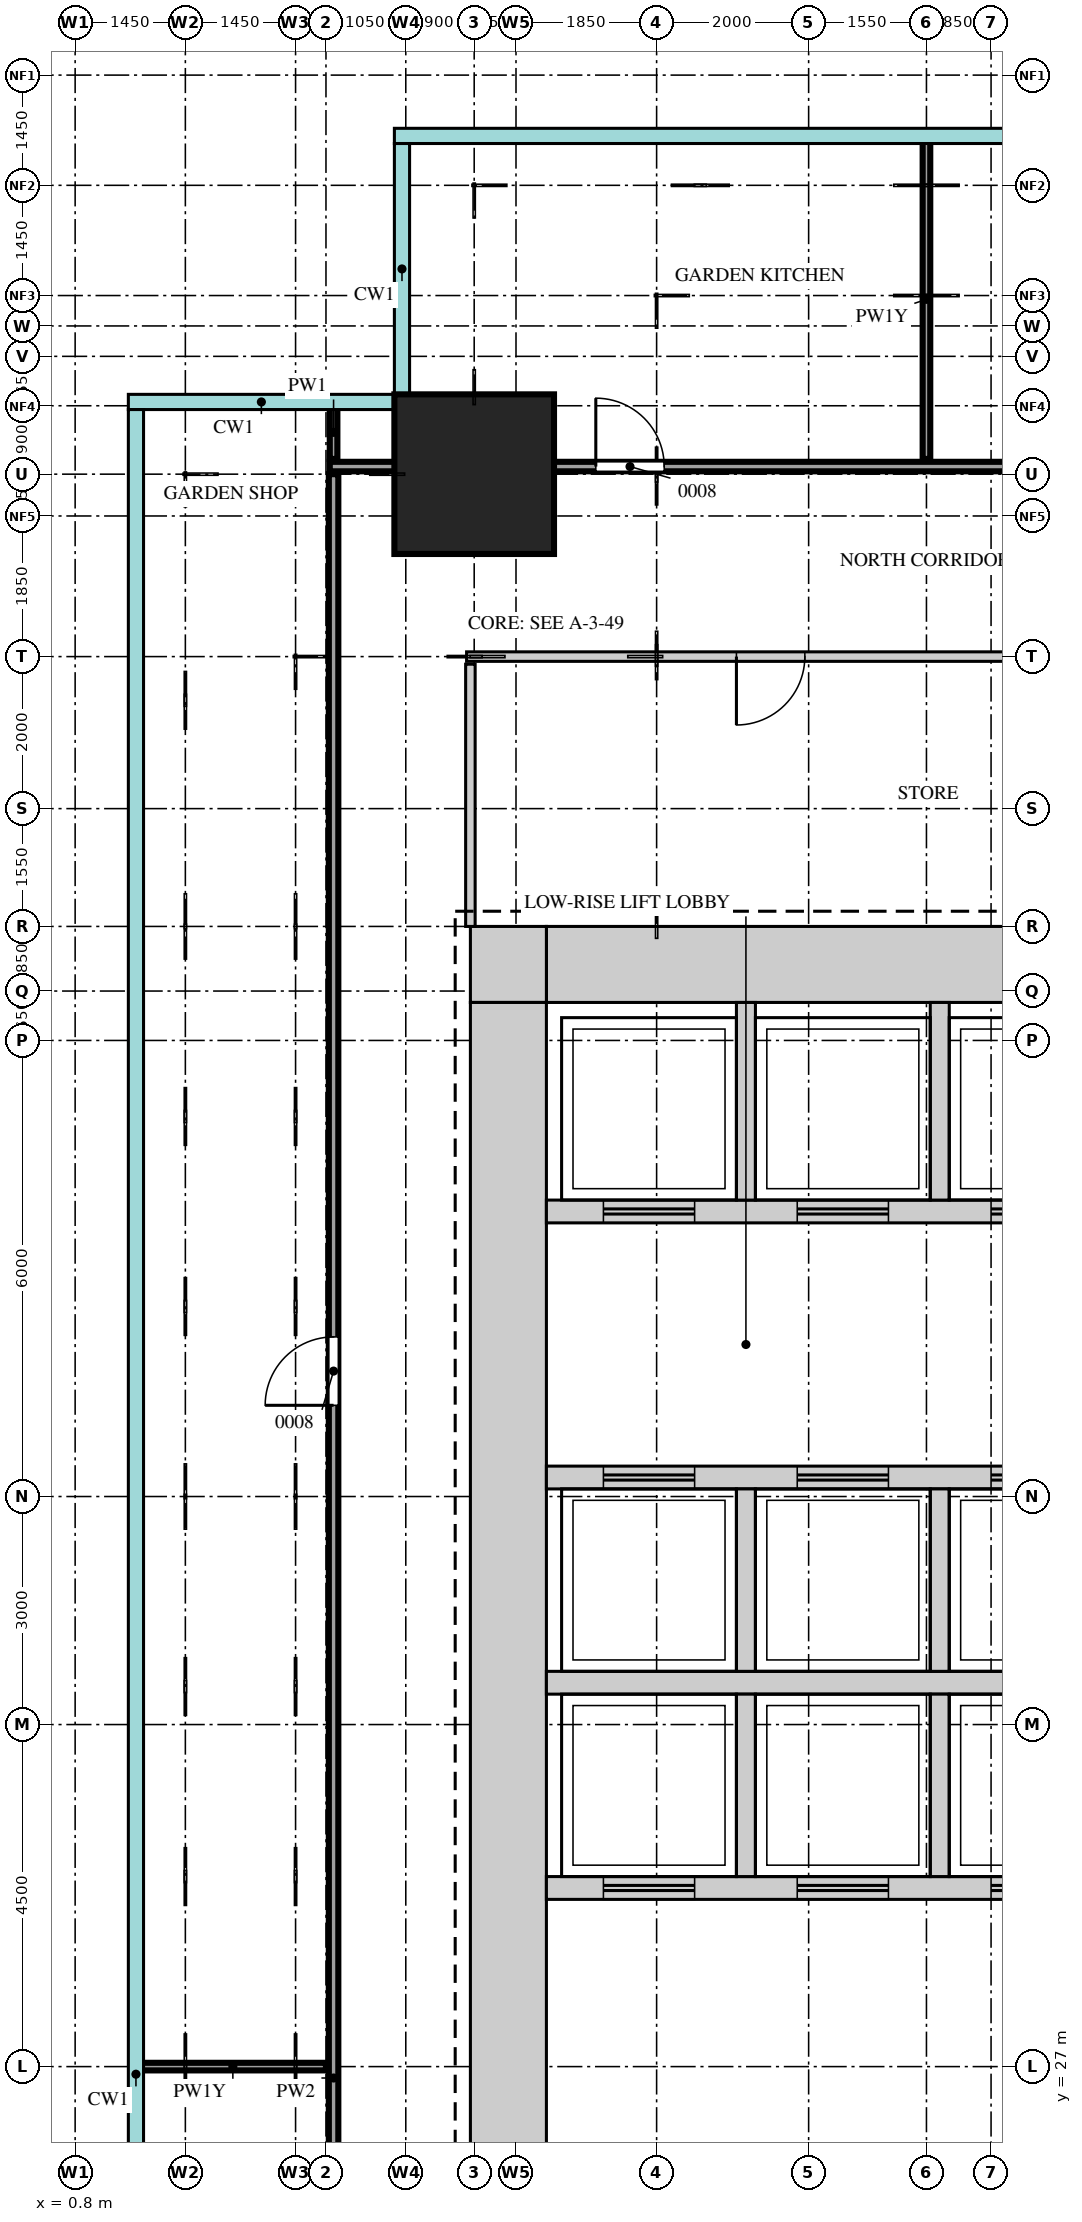
"""IFC4 building model, lengths in metres.
Left out: names, types, materials, properties, quantities, classifications, styles, units other than length and angle.
Written with IfcOpenShell. Run it as: python <this file> out.ifc"""

import sys

from ifc_helpers import new_model, si_unit, direction, frame, frame_2d, origin, origin_2d, place, context, subcontext, project, spatial, rectangle, extrude, source, transform, mapped, element, fill, save


model = new_model("IFC4")
c1 = context("Model", 3, precision=1e-05, world=origin(), true_north=direction((0.0, 1.0)))
c2 = subcontext(c1, "Body", "Model", "MODEL_VIEW")
j1 = project(units=[si_unit("LENGTHUNIT", "METRE"), si_unit("PLANEANGLEUNIT", "RADIAN")], contexts=[c1])
p1 = place(None, origin())
s1 = spatial("IfcSite", under=j1, at=p1, CompositionType="ELEMENT")
p2 = place(p1, origin())
s2 = spatial("IfcBuilding", under=s1, at=p2, CompositionType="ELEMENT")
p3 = place(p2, frame((0.0, 0.0, 158.7)))
s3 = spatial("IfcBuildingStorey", under=s2, at=p3, CompositionType="ELEMENT", Elevation=158.7)
m1 = source(origin(), c2, "Body", "SweptSolid", [
    extrude(rectangle(XDim=6.9, YDim=1.0, at=frame_2d((3.45, 0.0))), origin(), (0.0, 0.0, 1.0), 5.75),
])
p4 = place(p3, frame((7.0, 41.5, 0.0), z_axis=(0.0, 0.0, 1.0), x_axis=(1.0, 0.0, 0.0)))
e1 = element("IfcWall", 1, at=p4, inside=s3, PredefinedType="SHEAR", context=c2, shape_type="MappedRepresentation", body=[
    mapped(m1, transform((0.0, 0.0, 0.0))),
])
m2 = source(origin(), c2, "Body", "SweptSolid", [
    extrude(rectangle(XDim=1.0, YDim=1.0, at=frame_2d((0.5, 0.0))), origin(), (0.0, 0.0, 1.0), 5.75),
])
p5 = place(p3, frame((6.0, 41.5, 0.0), z_axis=(0.0, 0.0, 1.0), x_axis=(1.0, 0.0, 0.0)))
e2 = element("IfcWall", 2, at=p5, inside=s3, PredefinedType="SHEAR", context=c2, shape_type="MappedRepresentation", body=[
    mapped(m2, transform((0.0, 0.0, 0.0))),
])
m3 = source(origin(), c2, "Body", "SweptSolid", [
    extrude(rectangle(XDim=28.0, YDim=1.0, at=frame_2d((14.0, 0.0))), origin(), (0.0, 0.0, 1.0), 5.75),
])
p6 = place(p3, frame((6.5, 13.0, 0.0), z_axis=(0.0, 0.0, 1.0), x_axis=(0.0, 1.0, 0.0)))
e3 = element("IfcWall", 3, at=p6, inside=s3, PredefinedType="SHEAR", context=c2, shape_type="MappedRepresentation", body=[
    mapped(m3, transform((0.0, 0.0, 0.0))),
])
m4 = source(origin(), c2, "Body", "SweptSolid", [
    extrude(rectangle(XDim=16.0, YDim=0.3, at=frame_2d((8.0, 0.0))), origin(), (0.0, 0.0, 1.0), 5.75),
])
p7 = place(p3, frame((7.0, 32.05, 0.0), z_axis=(0.0, 0.0, 1.0), x_axis=(1.0, 0.0, 0.0)))
e4 = element("IfcWall", 4, at=p7, inside=s3, PredefinedType="STANDARD", context=c2, shape_type="MappedRepresentation", body=[
    mapped(m4, transform((0.0, 0.0, 0.0))),
])
m5 = source(origin(), c2, "Body", "SweptSolid", [
    extrude(rectangle(XDim=12.825, YDim=0.3, at=frame_2d((6.413, 0.0))), origin(), (0.0, 0.0, 1.0), 5.75),
])
p8 = place(p3, frame((7.0, 29.35, 0.0), z_axis=(0.0, 0.0, 1.0), x_axis=(1.0, 0.0, 0.0)))
e5 = element("IfcWall", 5, at=p8, inside=s3, PredefinedType="STANDARD", context=c2, shape_type="MappedRepresentation", body=[
    mapped(m5, transform((0.0, 0.0, 0.0))),
])
m6 = source(origin(), c2, "Body", "SweptSolid", [
    extrude(rectangle(XDim=1.2, YDim=2.1, at=frame_2d((0.6, 1.05))), frame((0.0, 0.16, 0.0), z_axis=(0.0, -1.0, 0.0), x_axis=(1.0, 0.0, 0.0)), (0.0, 0.0, 1.0), 0.32),
])
p9 = place(p8, frame((0.75, 0.0, 0.0)))
e6 = element("IfcOpeningElement", 6, at=p9, cuts=e5, PredefinedType="OPENING", context=c2, shape_type="MappedRepresentation", body=[
    mapped(m6, transform((0.0, 0.0, 0.0))),
])
p10 = place(p8, frame((3.3, 0.0, 0.0)))
e7 = element("IfcOpeningElement", 7, at=p10, cuts=e5, PredefinedType="OPENING", context=c2, shape_type="MappedRepresentation", body=[
    mapped(m6, transform((0.0, 0.0, 0.0))),
])
p11 = place(p8, frame((5.85, 0.0, 0.0)))
e8 = element("IfcOpeningElement", 8, at=p11, cuts=e5, PredefinedType="OPENING", context=c2, shape_type="MappedRepresentation", body=[
    mapped(m6, transform((0.0, 0.0, 0.0))),
])
p12 = place(p8, frame((8.4, 0.0, 0.0)))
e9 = element("IfcOpeningElement", 9, at=p12, cuts=e5, PredefinedType="OPENING", context=c2, shape_type="MappedRepresentation", body=[
    mapped(m6, transform((0.0, 0.0, 0.0))),
])
p13 = place(p8, frame((10.95, 0.0, 0.0)))
e10 = element("IfcOpeningElement", 10, at=p13, cuts=e5, PredefinedType="OPENING", context=c2, shape_type="MappedRepresentation", body=[
    mapped(m6, transform((0.0, 0.0, 0.0))),
])
p14 = place(p3, frame((7.0, 38.25, 0.0), z_axis=(0.0, 0.0, 1.0), x_axis=(1.0, 0.0, 0.0)))
e11 = element("IfcWall", 11, at=p14, inside=s3, PredefinedType="STANDARD", context=c2, shape_type="MappedRepresentation", body=[
    mapped(m4, transform((0.0, 0.0, 0.0))),
])
p15 = place(p14, frame((0.75, 0.0, 0.0)))
e12 = element("IfcOpeningElement", 12, at=p15, cuts=e11, PredefinedType="OPENING", context=c2, shape_type="MappedRepresentation", body=[
    mapped(m6, transform((0.0, 0.0, 0.0))),
])
p16 = place(p14, frame((3.3, 0.0, 0.0)))
e13 = element("IfcOpeningElement", 13, at=p16, cuts=e11, PredefinedType="OPENING", context=c2, shape_type="MappedRepresentation", body=[
    mapped(m6, transform((0.0, 0.0, 0.0))),
])
p17 = place(p14, frame((5.85, 0.0, 0.0)))
e14 = element("IfcOpeningElement", 14, at=p17, cuts=e11, PredefinedType="OPENING", context=c2, shape_type="MappedRepresentation", body=[
    mapped(m6, transform((0.0, 0.0, 0.0))),
])
p18 = place(p14, frame((8.4, 0.0, 0.0)))
e15 = element("IfcOpeningElement", 15, at=p18, cuts=e11, PredefinedType="OPENING", context=c2, shape_type="MappedRepresentation", body=[
    mapped(m6, transform((0.0, 0.0, 0.0))),
])
p19 = place(p14, frame((10.95, 0.0, 0.0)))
e16 = element("IfcOpeningElement", 16, at=p19, cuts=e11, PredefinedType="OPENING", context=c2, shape_type="MappedRepresentation", body=[
    mapped(m6, transform((0.0, 0.0, 0.0))),
])
p20 = place(p14, frame((13.5, 0.0, 0.0)))
e17 = element("IfcOpeningElement", 17, at=p20, cuts=e11, PredefinedType="OPENING", context=c2, shape_type="MappedRepresentation", body=[
    mapped(m6, transform((0.0, 0.0, 0.0))),
])
p21 = place(p3, frame((7.0, 34.75, 0.0), z_axis=(0.0, 0.0, 1.0), x_axis=(1.0, 0.0, 0.0)))
e18 = element("IfcWall", 18, at=p21, inside=s3, PredefinedType="STANDARD", context=c2, shape_type="MappedRepresentation", body=[
    mapped(m4, transform((0.0, 0.0, 0.0))),
])
p22 = place(p21, frame((0.75, 0.0, 0.0)))
e19 = element("IfcOpeningElement", 19, at=p22, cuts=e18, PredefinedType="OPENING", context=c2, shape_type="MappedRepresentation", body=[
    mapped(m6, transform((0.0, 0.0, 0.0))),
])
p23 = place(p21, frame((3.3, 0.0, 0.0)))
e20 = element("IfcOpeningElement", 20, at=p23, cuts=e18, PredefinedType="OPENING", context=c2, shape_type="MappedRepresentation", body=[
    mapped(m6, transform((0.0, 0.0, 0.0))),
])
p24 = place(p21, frame((5.85, 0.0, 0.0)))
e21 = element("IfcOpeningElement", 21, at=p24, cuts=e18, PredefinedType="OPENING", context=c2, shape_type="MappedRepresentation", body=[
    mapped(m6, transform((0.0, 0.0, 0.0))),
])
p25 = place(p21, frame((8.4, 0.0, 0.0)))
e22 = element("IfcOpeningElement", 22, at=p25, cuts=e18, PredefinedType="OPENING", context=c2, shape_type="MappedRepresentation", body=[
    mapped(m6, transform((0.0, 0.0, 0.0))),
])
p26 = place(p21, frame((10.95, 0.0, 0.0)))
e23 = element("IfcOpeningElement", 23, at=p26, cuts=e18, PredefinedType="OPENING", context=c2, shape_type="MappedRepresentation", body=[
    mapped(m6, transform((0.0, 0.0, 0.0))),
])
p27 = place(p21, frame((13.5, 0.0, 0.0)))
e24 = element("IfcOpeningElement", 24, at=p27, cuts=e18, PredefinedType="OPENING", context=c2, shape_type="MappedRepresentation", body=[
    mapped(m6, transform((0.0, 0.0, 0.0))),
])
m7 = source(origin(), c2, "Body", "SweptSolid", [
    extrude(rectangle(XDim=2.4, YDim=0.25, at=frame_2d((1.2, 0.0))), origin(), (0.0, 0.0, 1.0), 5.75),
])
for number, where, z_axis, x_axis in (
    (25, (9.625, 29.5, 0.0), (0.0, 0.0, 1.0), (0.0, 1.0, 0.0)),
    (26, (12.175, 29.5, 0.0), (0.0, 0.0, 1.0), (0.0, 1.0, 0.0)),
):
    element("IfcWall", number, at=place(p3, frame(where, z_axis=z_axis, x_axis=x_axis)), inside=s3, PredefinedType="STANDARD", context=c2, shape_type="MappedRepresentation", body=[
        mapped(m7, transform((0.0, 0.0, 0.0))),
    ])
m8 = source(origin(), c2, "Body", "SweptSolid", [
    extrude(rectangle(XDim=2.6, YDim=0.25, at=frame_2d((1.3, 0.0))), origin(), (0.0, 0.0, 1.0), 5.75),
])
for number, where, z_axis, x_axis in (
    (27, (9.625, 38.4, 0.0), (0.0, 0.0, 1.0), (0.0, 1.0, 0.0)),
    (28, (12.175, 38.4, 0.0), (0.0, 0.0, 1.0), (0.0, 1.0, 0.0)),
):
    element("IfcWall", number, at=place(p3, frame(where, z_axis=z_axis, x_axis=x_axis)), inside=s3, PredefinedType="STANDARD", context=c2, shape_type="MappedRepresentation", body=[
        mapped(m8, transform((0.0, 0.0, 0.0))),
    ])
m9 = source(origin(), c2, "Body", "SweptSolid", [
    extrude(rectangle(XDim=2.4, YDim=0.25, at=frame_2d((1.2, 0.0))), origin(), (0.0, 0.0, 1.0), 5.75),
])
for number, where, z_axis, x_axis in (
    (29, (9.625, 32.2, 0.0), (0.0, 0.0, 1.0), (0.0, 1.0, 0.0)),
    (30, (12.175, 32.2, 0.0), (0.0, 0.0, 1.0), (0.0, 1.0, 0.0)),
):
    element("IfcWall", number, at=place(p3, frame(where, z_axis=z_axis, x_axis=x_axis)), inside=s3, PredefinedType="STANDARD", context=c2, shape_type="MappedRepresentation", body=[
        mapped(m9, transform((0.0, 0.0, 0.0))),
    ])
m10 = source(origin(), c2, "Body", "SweptSolid", [
    extrude(rectangle(XDim=2.1, YDim=2.1, at=origin_2d()), origin(), (0.0, 0.0, 1.0), 6.0),
])
p28 = place(p3, frame((6.05, 47.95, 0.0), z_axis=(0.0, 0.0, 1.0), x_axis=(1.0, 0.0, 0.0)))
e31 = element("IfcColumn", 31, at=p28, inside=s3, PredefinedType="COLUMN", context=c2, shape_type="MappedRepresentation", body=[
    mapped(m10, transform((0.0, 0.0, 0.0))),
])
m11 = source(origin(), c2, "Body", "SweptSolid", [
    extrude(rectangle(XDim=41.8, YDim=0.125, at=frame_2d((20.9, 0.0))), origin(), (0.0, 0.0, 1.0), 5.75),
])
p29 = place(p3, frame((4.2, 6.15, 0.0), z_axis=(0.0, 0.0, 1.0), x_axis=(0.0, 1.0, 0.0)))
e32 = element("IfcWall", 32, at=p29, inside=s3, PredefinedType="PARTITIONING", context=c2, shape_type="MappedRepresentation", body=[
    mapped(m11, transform((0.0, 0.0, 0.0))),
])
m12 = source(origin(), c2, "Body", "SweptSolid", [
    extrude(rectangle(XDim=0.9, YDim=2.1, at=frame_2d((0.45, 1.05))), frame((0.0, 0.073, 0.0), z_axis=(0.0, -1.0, 0.0), x_axis=(1.0, 0.0, 0.0)), (0.0, 0.0, 1.0), 0.145),
])
p30 = place(p29, frame((10.95, 0.0, 0.0)))
e33 = element("IfcOpeningElement", 33, at=p30, cuts=e32, PredefinedType="OPENING", context=c2, shape_type="MappedRepresentation", body=[
    mapped(m12, transform((0.0, 0.0, 0.0))),
])
p31 = place(p29, frame((29.55, 0.0, 0.0)))
e34 = element("IfcOpeningElement", 34, at=p31, cuts=e32, PredefinedType="OPENING", context=c2, shape_type="MappedRepresentation", body=[
    mapped(m12, transform((0.0, 0.0, 0.0))),
])
m13 = source(origin(), c2, "Body", "SweptSolid", [
    extrude(rectangle(XDim=2.45, YDim=0.1, at=frame_2d((1.225, 0.0))), origin(), (0.0, 0.0, 1.0), 2.85),
])
p32 = place(p3, frame((1.65, 27.0, 0.0), z_axis=(0.0, 0.0, 1.0), x_axis=(1.0, 0.0, 0.0)))
e35 = element("IfcWall", 35, at=p32, inside=s3, PredefinedType="PARTITIONING", context=c2, shape_type="MappedRepresentation", body=[
    mapped(m13, transform((0.0, 0.0, 0.0))),
])
m14 = source(origin(), c2, "Body", "SweptSolid", [
    extrude(rectangle(XDim=3.45, YDim=0.125, at=frame_2d((1.725, 0.0))), origin(), (0.0, 0.0, 1.0), 5.75),
])
p33 = place(p3, frame((6.0, 42.0, 0.0), z_axis=(0.0, 0.0, 1.0), x_axis=(0.0, 1.0, 0.0)))
e36 = element("IfcWall", 36, at=p33, inside=s3, PredefinedType="PARTITIONING", context=c2, shape_type="MappedRepresentation", body=[
    mapped(m14, transform((0.0, 0.0, 0.0))),
])
m15 = source(origin(), c2, "Body", "SweptSolid", [
    extrude(rectangle(XDim=7.95, YDim=0.125, at=frame_2d((3.975, 0.0))), origin(), (0.0, 0.0, 1.0), 5.75),
])
p34 = place(p3, frame((5.95, 45.55, 0.0), z_axis=(0.0, 0.0, 1.0), x_axis=(1.0, 0.0, 0.0)))
e37 = element("IfcWall", 37, at=p34, inside=s3, PredefinedType="PARTITIONING", context=c2, shape_type="MappedRepresentation", body=[
    mapped(m15, transform((0.0, 0.0, 0.0))),
])
p35 = place(p34, frame((3.55, 0.0, 0.0)))
e38 = element("IfcOpeningElement", 38, at=p35, cuts=e37, PredefinedType="OPENING", context=c2, shape_type="MappedRepresentation", body=[
    mapped(m12, transform((0.0, 0.0, 0.0))),
])
m16 = source(origin(), c2, "Body", "SweptSolid", [
    extrude(rectangle(XDim=26.05, YDim=0.125, at=frame_2d((13.025, 0.0))), origin(), (0.0, 0.0, 1.0), 5.75),
])
p36 = place(p3, frame((4.15, 48.05, 0.0), z_axis=(0.0, 0.0, 1.0), x_axis=(1.0, 0.0, 0.0)))
e39 = element("IfcWall", 39, at=p36, inside=s3, PredefinedType="PARTITIONING", context=c2, shape_type="MappedRepresentation", body=[
    mapped(m16, transform((0.0, 0.0, 0.0))),
])
p37 = place(p36, frame((3.5, 0.0, 0.0)))
e40 = element("IfcOpeningElement", 40, at=p37, cuts=e39, PredefinedType="OPENING", context=c2, shape_type="MappedRepresentation", body=[
    mapped(m12, transform((0.0, 0.0, 0.0))),
])
p38 = place(p36, frame((16.6, 0.0, 0.0)))
e41 = element("IfcOpeningElement", 41, at=p38, cuts=e39, PredefinedType="OPENING", context=c2, shape_type="MappedRepresentation", body=[
    mapped(m12, transform((0.0, 0.0, 0.0))),
])
m17 = source(origin(), c2, "Body", "SweptSolid", [
    extrude(rectangle(XDim=0.7, YDim=0.1, at=frame_2d((0.35, 0.0))), origin(), (0.0, 0.0, 1.0), 5.75),
])
p39 = place(p3, frame((4.2, 48.15, 0.0), z_axis=(0.0, 0.0, 1.0), x_axis=(0.0, 1.0, 0.0)))
e42 = element("IfcWall", 42, at=p39, inside=s3, PredefinedType="PARTITIONING", context=c2, shape_type="MappedRepresentation", body=[
    mapped(m17, transform((0.0, 0.0, 0.0))),
])
m18 = source(origin(), c2, "Body", "SweptSolid", [
    extrude(rectangle(XDim=4.2, YDim=0.1, at=frame_2d((2.1, 0.0))), origin(), (0.0, 0.0, 1.0), 2.85),
])
p40 = place(p3, frame((12.0, 48.15, 0.0), z_axis=(0.0, 0.0, 1.0), x_axis=(0.0, 1.0, 0.0)))
e43 = element("IfcWall", 43, at=p40, inside=s3, PredefinedType="PARTITIONING", context=c2, shape_type="MappedRepresentation", body=[
    mapped(m18, transform((0.0, 0.0, 0.0))),
])
m19 = source(origin(), c2, "Body", "SweptSolid", [
    extrude(rectangle(XDim=0.9, YDim=2.1, at=frame_2d((0.45, 1.05))), frame((0.0, 0.025, 0.0), z_axis=(0.0, -1.0, 0.0), x_axis=(1.0, 0.0, 0.0)), (0.0, 0.0, 1.0), 0.05),
])
p41 = place(p31, origin())
e44 = element("IfcDoor", 44, at=p41, inside=s3, OperationType="SINGLE_SWING_RIGHT", PredefinedType="DOOR", context=c2, shape_type="MappedRepresentation", body=[
    mapped(m19, transform((0.0, 0.0, 0.0))),
])
fill(e34, e44)
p42 = place(p37, origin())
e45 = element("IfcDoor", 45, at=p42, inside=s3, OperationType="SINGLE_SWING_RIGHT", PredefinedType="DOOR", context=c2, shape_type="MappedRepresentation", body=[
    mapped(m19, transform((0.0, 0.0, 0.0))),
])
fill(e40, e45)
p43 = place(p35, origin())
e46 = element("IfcDoor", 46, at=p43, inside=s3, OperationType="SINGLE_SWING_LEFT", PredefinedType="DOOR", context=c2, shape_type="MappedRepresentation", body=[
    mapped(m19, transform((0.0, 0.0, 0.0))),
])
fill(e38, e46)
m20 = source(origin(), c2, "Body", "SweptSolid", [
    extrude(rectangle(XDim=1.2, YDim=2.1, at=frame_2d((0.6, 1.05))), frame((0.0, 0.025, 0.0), z_axis=(0.0, -1.0, 0.0), x_axis=(1.0, 0.0, 0.0)), (0.0, 0.0, 1.0), 0.05),
])
p44 = place(p22, origin())
e47 = element("IfcDoor", 47, at=p44, inside=s3, OperationType="DOUBLE_DOOR_SLIDING", PredefinedType="DOOR", context=c2, shape_type="MappedRepresentation", body=[
    mapped(m20, transform((0.0, 0.0, 0.0))),
])
fill(e19, e47)
p45 = place(p23, origin())
e48 = element("IfcDoor", 48, at=p45, inside=s3, OperationType="DOUBLE_DOOR_SLIDING", PredefinedType="DOOR", context=c2, shape_type="MappedRepresentation", body=[
    mapped(m20, transform((0.0, 0.0, 0.0))),
])
fill(e20, e48)
p46 = place(p24, origin())
e49 = element("IfcDoor", 49, at=p46, inside=s3, OperationType="DOUBLE_DOOR_SLIDING", PredefinedType="DOOR", context=c2, shape_type="MappedRepresentation", body=[
    mapped(m20, transform((0.0, 0.0, 0.0))),
])
fill(e21, e49)
p47 = place(p15, origin())
e50 = element("IfcDoor", 50, at=p47, inside=s3, OperationType="DOUBLE_DOOR_SLIDING", PredefinedType="DOOR", context=c2, shape_type="MappedRepresentation", body=[
    mapped(m20, transform((0.0, 0.0, 0.0))),
])
fill(e12, e50)
p48 = place(p16, origin())
e51 = element("IfcDoor", 51, at=p48, inside=s3, OperationType="DOUBLE_DOOR_SLIDING", PredefinedType="DOOR", context=c2, shape_type="MappedRepresentation", body=[
    mapped(m20, transform((0.0, 0.0, 0.0))),
])
fill(e13, e51)
p49 = place(p17, origin())
e52 = element("IfcDoor", 52, at=p49, inside=s3, OperationType="DOUBLE_DOOR_SLIDING", PredefinedType="DOOR", context=c2, shape_type="MappedRepresentation", body=[
    mapped(m20, transform((0.0, 0.0, 0.0))),
])
fill(e14, e52)
p50 = place(p9, origin())
e53 = element("IfcDoor", 53, at=p50, inside=s3, OperationType="DOUBLE_DOOR_SLIDING", PredefinedType="DOOR", context=c2, shape_type="MappedRepresentation", body=[
    mapped(m20, transform((0.0, 0.0, 0.0))),
])
fill(e6, e53)
p51 = place(p10, origin())
e54 = element("IfcDoor", 54, at=p51, inside=s3, OperationType="DOUBLE_DOOR_SLIDING", PredefinedType="DOOR", context=c2, shape_type="MappedRepresentation", body=[
    mapped(m20, transform((0.0, 0.0, 0.0))),
])
fill(e7, e54)
p52 = place(p11, origin())
e55 = element("IfcDoor", 55, at=p52, inside=s3, OperationType="DOUBLE_DOOR_SLIDING", PredefinedType="DOOR", context=c2, shape_type="MappedRepresentation", body=[
    mapped(m20, transform((0.0, 0.0, 0.0))),
])
fill(e8, e55)
save(model, sys.argv[1])
